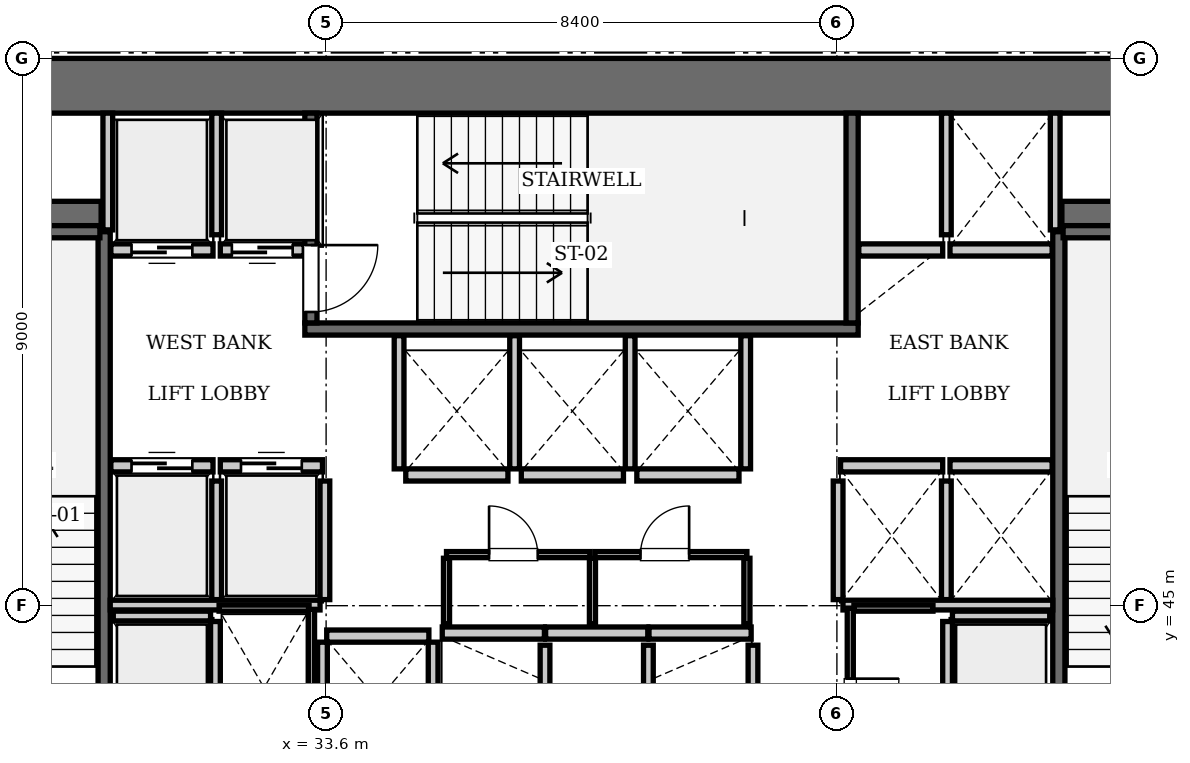
"""IFC4 building model, lengths in metres.
Left out: names, types, materials, properties, quantities, classifications, styles, units other than length and angle.
Written with IfcOpenShell. Run it as: python <this file> out.ifc"""

import sys

from ifc_helpers import new_model, si_unit, direction, frame, frame_2d, origin, place, context, subcontext, project, spatial, rectangle, extrude, element, fill, save


model = new_model("IFC4")
c1 = context("Model", 3, precision=1e-05, world=origin(), true_north=direction((0.0, 1.0)))
c2 = subcontext(c1, "Body", "Model", "MODEL_VIEW")
j1 = project(units=[si_unit("LENGTHUNIT", "METRE"), si_unit("PLANEANGLEUNIT", "RADIAN")], contexts=[c1])
p1 = place(None, origin())
s1 = spatial("IfcSite", under=j1, at=p1, CompositionType="ELEMENT")
p2 = place(p1, origin())
s2 = spatial("IfcBuilding", under=s1, at=p2, CompositionType="ELEMENT")
p3 = place(p2, frame((0.0, 0.0, 61.6)))
s3 = spatial("IfcBuildingStorey", under=s2, at=p3, CompositionType="ELEMENT", Elevation=61.6)
p4 = place(p3, frame((25.2, 53.55, 0.0), z_axis=(0.0, 0.0, 1.0), x_axis=(1.0, 0.0, 0.0)))
e1 = element("IfcWall", 1, at=p4, inside=s3, PredefinedType="SHEAR", context=c2, shape_type="SweptSolid", body=[
    extrude(rectangle(XDim=25.2, YDim=0.9, at=frame_2d((12.6, 0.0))), origin(), (0.0, 0.0, 1.0), 3.85),
])
p5 = place(p3, frame((26.1, 51.4, 0.0), z_axis=(0.0, 0.0, 1.0), x_axis=(1.0, 0.0, 0.0)))
e2 = element("IfcWall", 2, at=p5, inside=s3, PredefinedType="SHEAR", context=c2, shape_type="SweptSolid", body=[
    extrude(rectangle(XDim=3.8, YDim=0.5, at=frame_2d((1.9, 0.0))), origin(), (0.0, 0.0, 1.0), 3.85),
])
p6 = place(p3, frame((45.7, 51.4, 0.0), z_axis=(0.0, 0.0, 1.0), x_axis=(1.0, 0.0, 0.0)))
e3 = element("IfcWall", 3, at=p6, inside=s3, PredefinedType="SHEAR", context=c2, shape_type="SweptSolid", body=[
    extrude(rectangle(XDim=3.8, YDim=0.5, at=frame_2d((1.9, 0.0))), origin(), (0.0, 0.0, 1.0), 3.85),
])
p7 = place(p3, frame((29.95, 42.3, 0.0), z_axis=(0.0, 0.0, 1.0), x_axis=(0.0, 1.0, 0.0)))
e4 = element("IfcWall", 4, at=p7, inside=s3, PredefinedType="SOLIDWALL", context=c2, shape_type="SweptSolid", body=[
    extrude(rectangle(XDim=8.85, YDim=0.2, at=frame_2d((4.425, 0.0))), origin(), (0.0, 0.0, 1.0), 3.61),
])
p8 = place(p3, frame((26.38, 51.15, 0.0), z_axis=(0.0, 0.0, 1.0), x_axis=(1.0, 0.0, 0.0)))
e5 = element("IfcWall", 5, at=p8, inside=s3, PredefinedType="SOLIDWALL", context=c2, shape_type="SweptSolid", body=[
    extrude(rectangle(XDim=3.5, YDim=0.2, at=frame_2d((1.75, 0.0))), origin(), (0.0, 0.0, 1.0), 3.61),
])
p9 = place(p3, frame((33.25, 49.55, 0.0), z_axis=(0.0, 0.0, 1.0), x_axis=(1.0, 0.0, 0.0)))
e6 = element("IfcWall", 6, at=p9, inside=s3, PredefinedType="SOLIDWALL", context=c2, shape_type="SweptSolid", body=[
    extrude(rectangle(XDim=9.1, YDim=0.2, at=frame_2d((4.55, 0.0))), origin(), (0.0, 0.0, 1.0), 3.61),
])
p10 = place(p3, frame((42.25, 49.65, 0.0), z_axis=(0.0, 0.0, 1.0), x_axis=(0.0, 1.0, 0.0)))
e7 = element("IfcWall", 7, at=p10, inside=s3, PredefinedType="SOLIDWALL", context=c2, shape_type="SweptSolid", body=[
    extrude(rectangle(XDim=3.45, YDim=0.2, at=frame_2d((1.725, 0.0))), origin(), (0.0, 0.0, 1.0), 3.61),
])
p11 = place(p3, frame((33.35, 49.65, 0.0), z_axis=(0.0, 0.0, 1.0), x_axis=(0.0, 1.0, 0.0)))
e8 = element("IfcWall", 8, at=p11, inside=s3, PredefinedType="SOLIDWALL", context=c2, shape_type="SweptSolid", body=[
    extrude(rectangle(XDim=3.45, YDim=0.2, at=frame_2d((1.725, 0.0))), origin(), (0.0, 0.0, 1.0), 3.61),
])
p12 = place(p11, frame((0.18, 0.0, 0.0)))
e9 = element("IfcOpeningElement", 9, at=p12, cuts=e8, PredefinedType="OPENING", context=c2, shape_type="SweptSolid", body=[
    extrude(rectangle(XDim=1.1, YDim=2.15, at=frame_2d((0.55, 1.075))), frame((0.0, 0.11, 0.0), z_axis=(0.0, -1.0, 0.0), x_axis=(1.0, 0.0, 0.0)), (0.0, 0.0, 1.0), 0.22),
])
p13 = place(p3, frame((45.65, 42.3, 0.0), z_axis=(0.0, 0.0, 1.0), x_axis=(0.0, 1.0, 0.0)))
e10 = element("IfcWall", 10, at=p13, inside=s3, PredefinedType="SOLIDWALL", context=c2, shape_type="SweptSolid", body=[
    extrude(rectangle(XDim=8.85, YDim=0.2, at=frame_2d((4.425, 0.0))), origin(), (0.0, 0.0, 1.0), 3.61),
])
p14 = place(p3, frame((45.72, 51.15, 0.0), z_axis=(0.0, 0.0, 1.0), x_axis=(1.0, 0.0, 0.0)))
e11 = element("IfcWall", 11, at=p14, inside=s3, PredefinedType="SOLIDWALL", context=c2, shape_type="SweptSolid", body=[
    extrude(rectangle(XDim=3.5, YDim=0.2, at=frame_2d((1.75, 0.0))), origin(), (0.0, 0.0, 1.0), 3.61),
])
p15 = place(p3, frame((30.06, 47.3, 0.0), z_axis=(0.0, 0.0, 1.0), x_axis=(1.0, 0.0, 0.0)))
e12 = element("IfcWall", 12, at=p15, inside=s3, PredefinedType="SOLIDWALL", context=c2, shape_type="SweptSolid", body=[
    extrude(rectangle(XDim=1.68, YDim=0.2, at=frame_2d((0.84, 0.0))), origin(), (0.0, 0.0, 1.0), 3.61),
])
p16 = place(p15, frame((0.34, 0.0, 0.0)))
e13 = element("IfcOpeningElement", 13, at=p16, cuts=e12, PredefinedType="OPENING", context=c2, shape_type="SweptSolid", body=[
    extrude(rectangle(XDim=1.0, YDim=2.15, at=frame_2d((0.5, 1.075))), frame((0.0, 0.11, 0.0), z_axis=(0.0, -1.0, 0.0), x_axis=(1.0, 0.0, 0.0)), (0.0, 0.0, 1.0), 0.22),
])
p17 = place(p3, frame((31.86, 47.3, 0.0), z_axis=(0.0, 0.0, 1.0), x_axis=(1.0, 0.0, 0.0)))
e14 = element("IfcWall", 14, at=p17, inside=s3, PredefinedType="SOLIDWALL", context=c2, shape_type="SweptSolid", body=[
    extrude(rectangle(XDim=1.68, YDim=0.2, at=frame_2d((0.84, 0.0))), origin(), (0.0, 0.0, 1.0), 3.61),
])
p18 = place(p17, frame((0.34, 0.0, 0.0)))
e15 = element("IfcOpeningElement", 15, at=p18, cuts=e14, PredefinedType="OPENING", context=c2, shape_type="SweptSolid", body=[
    extrude(rectangle(XDim=1.0, YDim=2.15, at=frame_2d((0.5, 1.075))), frame((0.0, 0.11, 0.0), z_axis=(0.0, -1.0, 0.0), x_axis=(1.0, 0.0, 0.0)), (0.0, 0.0, 1.0), 0.22),
])
p19 = place(p3, frame((30.06, 50.85, 0.0), z_axis=(0.0, 0.0, 1.0), x_axis=(1.0, 0.0, 0.0)))
e16 = element("IfcWall", 16, at=p19, inside=s3, PredefinedType="SOLIDWALL", context=c2, shape_type="SweptSolid", body=[
    extrude(rectangle(XDim=1.68, YDim=0.2, at=frame_2d((0.84, 0.0))), origin(), (0.0, 0.0, 1.0), 3.61),
])
p20 = place(p19, frame((0.34, 0.0, 0.0)))
e17 = element("IfcOpeningElement", 17, at=p20, cuts=e16, PredefinedType="OPENING", context=c2, shape_type="SweptSolid", body=[
    extrude(rectangle(XDim=1.0, YDim=2.15, at=frame_2d((0.5, 1.075))), frame((0.0, 0.11, 0.0), z_axis=(0.0, -1.0, 0.0), x_axis=(1.0, 0.0, 0.0)), (0.0, 0.0, 1.0), 0.22),
])
p21 = place(p3, frame((31.86, 50.85, 0.0), z_axis=(0.0, 0.0, 1.0), x_axis=(1.0, 0.0, 0.0)))
e18 = element("IfcWall", 18, at=p21, inside=s3, PredefinedType="SOLIDWALL", context=c2, shape_type="SweptSolid", body=[
    extrude(rectangle(XDim=1.38, YDim=0.2, at=frame_2d((0.69, 0.0))), origin(), (0.0, 0.0, 1.0), 3.61),
])
p22 = place(p21, frame((0.19, 0.0, 0.0)))
e19 = element("IfcOpeningElement", 19, at=p22, cuts=e18, PredefinedType="OPENING", context=c2, shape_type="SweptSolid", body=[
    extrude(rectangle(XDim=1.0, YDim=2.15, at=frame_2d((0.5, 1.075))), frame((0.0, 0.11, 0.0), z_axis=(0.0, -1.0, 0.0), x_axis=(1.0, 0.0, 0.0)), (0.0, 0.0, 1.0), 0.22),
])
for number, where, z_axis, x_axis in (
    (20, (42.06, 47.3, 0.0), (0.0, 0.0, 1.0), (1.0, 0.0, 0.0)),
    (21, (43.86, 47.3, 0.0), (0.0, 0.0, 1.0), (1.0, 0.0, 0.0)),
):
    element("IfcWall", number, at=place(p3, frame(where, z_axis=z_axis, x_axis=x_axis)), inside=s3, PredefinedType="SOLIDWALL", context=c2, shape_type="SweptSolid", body=[
        extrude(rectangle(XDim=1.68, YDim=0.2, at=frame_2d((0.84, 0.0))), origin(), (0.0, 0.0, 1.0), 3.61),
    ])
p23 = place(p3, frame((42.36, 50.85, 0.0), z_axis=(0.0, 0.0, 1.0), x_axis=(1.0, 0.0, 0.0)))
e22 = element("IfcWall", 22, at=p23, inside=s3, PredefinedType="SOLIDWALL", context=c2, shape_type="SweptSolid", body=[
    extrude(rectangle(XDim=1.38, YDim=0.2, at=frame_2d((0.69, 0.0))), origin(), (0.0, 0.0, 1.0), 3.61),
])
for number, where, z_axis, x_axis in (
    (23, (43.86, 50.85, 0.0), (0.0, 0.0, 1.0), (1.0, 0.0, 0.0)),
    (24, (35.51, 44.55, 0.0), (0.0, 0.0, 1.0), (1.0, 0.0, 0.0)),
    (25, (37.21, 44.55, 0.0), (0.0, 0.0, 1.0), (1.0, 0.0, 0.0)),
):
    element("IfcWall", number, at=place(p3, frame(where, z_axis=z_axis, x_axis=x_axis)), inside=s3, PredefinedType="SOLIDWALL", context=c2, shape_type="SweptSolid", body=[
        extrude(rectangle(XDim=1.68, YDim=0.2, at=frame_2d((0.84, 0.0))), origin(), (0.0, 0.0, 1.0), 3.61),
    ])
for number, where, z_axis, x_axis in (
    (26, (38.91, 44.55, 0.0), (0.0, 0.0, 1.0), (1.0, 0.0, 0.0)),
    (27, (34.91, 47.15, 0.0), (0.0, 0.0, 1.0), (1.0, 0.0, 0.0)),
):
    element("IfcWall", number, at=place(p3, frame(where, z_axis=z_axis, x_axis=x_axis)), inside=s3, PredefinedType="SOLIDWALL", context=c2, shape_type="SweptSolid", body=[
        extrude(rectangle(XDim=1.68, YDim=0.2, at=frame_2d((0.84, 0.0))), origin(), (0.0, 0.0, 1.0), 3.61),
    ])
for number, where, z_axis, x_axis in (
    (28, (36.81, 47.15, 0.0), (0.0, 0.0, 1.0), (1.0, 0.0, 0.0)),
    (29, (38.71, 47.15, 0.0), (0.0, 0.0, 1.0), (1.0, 0.0, 0.0)),
    (30, (33.61, 44.5, 0.0), (0.0, 0.0, 1.0), (1.0, 0.0, 0.0)),
):
    element("IfcWall", number, at=place(p3, frame(where, z_axis=z_axis, x_axis=x_axis)), inside=s3, PredefinedType="SOLIDWALL", context=c2, shape_type="SweptSolid", body=[
        extrude(rectangle(XDim=1.68, YDim=0.2, at=frame_2d((0.84, 0.0))), origin(), (0.0, 0.0, 1.0), 3.61),
    ])
p24 = place(p3, frame((30.1, 44.83, 0.0), z_axis=(0.0, 0.0, 1.0), x_axis=(1.0, 0.0, 0.0)))
e31 = element("IfcWall", 31, at=p24, inside=s3, PredefinedType="SOLIDWALL", context=c2, shape_type="SweptSolid", body=[
    extrude(rectangle(XDim=1.6, YDim=0.16, at=frame_2d((0.8, 0.0))), origin(), (0.0, 0.0, 1.0), 3.61),
])
p25 = place(p3, frame((31.78, 42.3, 0.0), z_axis=(0.0, 0.0, 1.0), x_axis=(0.0, 1.0, 0.0)))
e32 = element("IfcWall", 32, at=p25, inside=s3, PredefinedType="SOLIDWALL", context=c2, shape_type="SweptSolid", body=[
    extrude(rectangle(XDim=2.44, YDim=0.16, at=frame_2d((1.22, 0.0))), origin(), (0.0, 0.0, 1.0), 3.61),
])
p26 = place(p3, frame((43.9, 44.83, 0.0), z_axis=(0.0, 0.0, 1.0), x_axis=(1.0, 0.0, 0.0)))
e33 = element("IfcWall", 33, at=p26, inside=s3, PredefinedType="SOLIDWALL", context=c2, shape_type="SweptSolid", body=[
    extrude(rectangle(XDim=1.6, YDim=0.16, at=frame_2d((0.8, 0.0))), origin(), (0.0, 0.0, 1.0), 3.61),
])
p27 = place(p3, frame((43.82, 42.3, 0.0), z_axis=(0.0, 0.0, 1.0), x_axis=(0.0, 1.0, 0.0)))
e34 = element("IfcWall", 34, at=p27, inside=s3, PredefinedType="SOLIDWALL", context=c2, shape_type="SweptSolid", body=[
    extrude(rectangle(XDim=2.44, YDim=0.16, at=frame_2d((1.22, 0.0))), origin(), (0.0, 0.0, 1.0), 3.61),
])
for number, where, z_axis, x_axis in (
    (35, (31.8, 45.1, 0.0), (0.0, 0.0, 1.0), (0.0, 1.0, 0.0)),
    (36, (33.58, 45.1, 0.0), (0.0, 0.0, 1.0), (0.0, 1.0, 0.0)),
):
    element("IfcWall", number, at=place(p3, frame(where, z_axis=z_axis, x_axis=x_axis)), inside=s3, PredefinedType="SOLIDWALL", context=c2, shape_type="SweptSolid", body=[
        extrude(rectangle(XDim=1.95, YDim=0.16, at=frame_2d((0.975, 0.0))), origin(), (0.0, 0.0, 1.0), 3.61),
    ])
p28 = place(p3, frame((30.05, 45.01, 0.0), z_axis=(0.0, 0.0, 1.0), x_axis=(1.0, 0.0, 0.0)))
e37 = element("IfcWall", 37, at=p28, inside=s3, PredefinedType="SOLIDWALL", context=c2, shape_type="SweptSolid", body=[
    extrude(rectangle(XDim=3.45, YDim=0.16, at=frame_2d((1.725, 0.0))), origin(), (0.0, 0.0, 1.0), 3.61),
])
p29 = place(p3, frame((30.01, 51.18, 0.0), z_axis=(0.0, 0.0, 1.0), x_axis=(0.0, 1.0, 0.0)))
e38 = element("IfcWall", 38, at=p29, inside=s3, PredefinedType="SOLIDWALL", context=c2, shape_type="SweptSolid", body=[
    extrude(rectangle(XDim=1.92, YDim=0.16, at=frame_2d((0.96, 0.0))), origin(), (0.0, 0.0, 1.0), 3.61),
])
p30 = place(p3, frame((31.8, 51.1, 0.0), z_axis=(0.0, 0.0, 1.0), x_axis=(0.0, 1.0, 0.0)))
e39 = element("IfcWall", 39, at=p30, inside=s3, PredefinedType="SOLIDWALL", context=c2, shape_type="SweptSolid", body=[
    extrude(rectangle(XDim=2.0, YDim=0.16, at=frame_2d((1.0, 0.0))), origin(), (0.0, 0.0, 1.0), 3.61),
])
for number, where, z_axis, x_axis in (
    (40, (42.02, 45.1, 0.0), (0.0, 0.0, 1.0), (0.0, 1.0, 0.0)),
    (41, (43.8, 45.1, 0.0), (0.0, 0.0, 1.0), (0.0, 1.0, 0.0)),
):
    element("IfcWall", number, at=place(p3, frame(where, z_axis=z_axis, x_axis=x_axis)), inside=s3, PredefinedType="SOLIDWALL", context=c2, shape_type="SweptSolid", body=[
        extrude(rectangle(XDim=1.95, YDim=0.16, at=frame_2d((0.975, 0.0))), origin(), (0.0, 0.0, 1.0), 3.61),
    ])
p31 = place(p3, frame((42.1, 45.01, 0.0), z_axis=(0.0, 0.0, 1.0), x_axis=(1.0, 0.0, 0.0)))
e42 = element("IfcWall", 42, at=p31, inside=s3, PredefinedType="SOLIDWALL", context=c2, shape_type="SweptSolid", body=[
    extrude(rectangle(XDim=3.45, YDim=0.16, at=frame_2d((1.725, 0.0))), origin(), (0.0, 0.0, 1.0), 3.61),
])
p32 = place(p3, frame((45.59, 51.18, 0.0), z_axis=(0.0, 0.0, 1.0), x_axis=(0.0, 1.0, 0.0)))
e43 = element("IfcWall", 43, at=p32, inside=s3, PredefinedType="SOLIDWALL", context=c2, shape_type="SweptSolid", body=[
    extrude(rectangle(XDim=1.92, YDim=0.16, at=frame_2d((0.96, 0.0))), origin(), (0.0, 0.0, 1.0), 3.61),
])
p33 = place(p3, frame((43.8, 51.1, 0.0), z_axis=(0.0, 0.0, 1.0), x_axis=(0.0, 1.0, 0.0)))
e44 = element("IfcWall", 44, at=p33, inside=s3, PredefinedType="SOLIDWALL", context=c2, shape_type="SweptSolid", body=[
    extrude(rectangle(XDim=2.0, YDim=0.16, at=frame_2d((1.0, 0.0))), origin(), (0.0, 0.0, 1.0), 3.61),
])
for number, where, z_axis, x_axis in (
    (45, (37.2, 42.3, 0.0), (0.0, 0.0, 1.0), (0.0, 1.0, 0.0)),
    (46, (38.9, 42.3, 0.0), (0.0, 0.0, 1.0), (0.0, 1.0, 0.0)),
    (47, (40.62, 42.3, 0.0), (0.0, 0.0, 1.0), (0.0, 1.0, 0.0)),
):
    element("IfcWall", number, at=place(p3, frame(where, z_axis=z_axis, x_axis=x_axis)), inside=s3, PredefinedType="SOLIDWALL", context=c2, shape_type="SweptSolid", body=[
        extrude(rectangle(XDim=2.05, YDim=0.16, at=frame_2d((1.025, 0.0))), origin(), (0.0, 0.0, 1.0), 3.61),
    ])
for number, where, z_axis, x_axis in (
    (48, (34.8, 47.25, 0.0), (0.0, 0.0, 1.0), (0.0, 1.0, 0.0)),
    (49, (36.7, 47.25, 0.0), (0.0, 0.0, 1.0), (0.0, 1.0, 0.0)),
    (50, (38.6, 47.25, 0.0), (0.0, 0.0, 1.0), (0.0, 1.0, 0.0)),
    (51, (40.5, 47.25, 0.0), (0.0, 0.0, 1.0), (0.0, 1.0, 0.0)),
):
    element("IfcWall", number, at=place(p3, frame(where, z_axis=z_axis, x_axis=x_axis)), inside=s3, PredefinedType="SOLIDWALL", context=c2, shape_type="SweptSolid", body=[
        extrude(rectangle(XDim=2.19, YDim=0.16, at=frame_2d((1.095, 0.0))), origin(), (0.0, 0.0, 1.0), 3.61),
    ])
for number, where, z_axis, x_axis in (
    (52, (33.54, 42.3, 0.0), (0.0, 0.0, 1.0), (0.0, 1.0, 0.0)),
    (53, (35.36, 42.3, 0.0), (0.0, 0.0, 1.0), (0.0, 1.0, 0.0)),
):
    element("IfcWall", number, at=place(p3, frame(where, z_axis=z_axis, x_axis=x_axis)), inside=s3, PredefinedType="SOLIDWALL", context=c2, shape_type="SweptSolid", body=[
        extrude(rectangle(XDim=2.1, YDim=0.16, at=frame_2d((1.05, 0.0))), origin(), (0.0, 0.0, 1.0), 3.61),
    ])
p34 = place(p3, frame((31.84, 44.96, 0.0), z_axis=(0.0, 0.0, 1.0), x_axis=(1.0, 0.0, 0.0)))
e54 = element("IfcWall", 54, at=p34, inside=s3, PredefinedType="PARTITIONING", context=c2, shape_type="SweptSolid", body=[
    extrude(rectangle(XDim=1.48, YDim=0.1, at=frame_2d((0.74, 0.0))), origin(), (0.0, 0.0, 1.0), 3.61),
])
p35 = place(p3, frame((33.36, 42.36, 0.0), z_axis=(0.0, 0.0, 1.0), x_axis=(0.0, 1.0, 0.0)))
e55 = element("IfcWall", 55, at=p35, inside=s3, PredefinedType="PARTITIONING", context=c2, shape_type="SweptSolid", body=[
    extrude(rectangle(XDim=2.58, YDim=0.1, at=frame_2d((1.29, 0.0))), origin(), (0.0, 0.0, 1.0), 3.61),
])
p36 = place(p3, frame((35.58, 45.84, 0.0), z_axis=(0.0, 0.0, 1.0), x_axis=(1.0, 0.0, 0.0)))
e56 = element("IfcWall", 56, at=p36, inside=s3, PredefinedType="PARTITIONING", context=c2, shape_type="SweptSolid", body=[
    extrude(rectangle(XDim=2.36, YDim=0.1, at=frame_2d((1.18, 0.0))), origin(), (0.0, 0.0, 1.0), 3.61),
])
p37 = place(p36, frame((0.7, 0.0, 0.0)))
e57 = element("IfcOpeningElement", 57, at=p37, cuts=e56, PredefinedType="OPENING", context=c2, shape_type="SweptSolid", body=[
    extrude(rectangle(XDim=0.8, YDim=2.05, at=frame_2d((0.4, 1.025))), frame((0.0, 0.06, 0.0), z_axis=(0.0, -1.0, 0.0), x_axis=(1.0, 0.0, 0.0)), (0.0, 0.0, 1.0), 0.12),
])
p38 = place(p3, frame((38.02, 45.84, 0.0), z_axis=(0.0, 0.0, 1.0), x_axis=(1.0, 0.0, 0.0)))
e58 = element("IfcWall", 58, at=p38, inside=s3, PredefinedType="PARTITIONING", context=c2, shape_type="SweptSolid", body=[
    extrude(rectangle(XDim=2.5, YDim=0.1, at=frame_2d((1.25, 0.0))), origin(), (0.0, 0.0, 1.0), 3.61),
])
p39 = place(p38, frame((0.75, 0.0, 0.0)))
e59 = element("IfcOpeningElement", 59, at=p39, cuts=e58, PredefinedType="OPENING", context=c2, shape_type="SweptSolid", body=[
    extrude(rectangle(XDim=0.8, YDim=2.05, at=frame_2d((0.4, 1.025))), frame((0.0, 0.06, 0.0), z_axis=(0.0, -1.0, 0.0), x_axis=(1.0, 0.0, 0.0)), (0.0, 0.0, 1.0), 0.12),
])
for number, where, z_axis, x_axis in (
    (60, (35.58, 44.7, 0.0), (0.0, 0.0, 1.0), (0.0, 1.0, 0.0)),
    (61, (37.98, 44.7, 0.0), (0.0, 0.0, 1.0), (0.0, 1.0, 0.0)),
    (62, (40.52, 44.7, 0.0), (0.0, 0.0, 1.0), (0.0, 1.0, 0.0)),
):
    element("IfcWall", number, at=place(p3, frame(where, z_axis=z_axis, x_axis=x_axis)), inside=s3, PredefinedType="PARTITIONING", context=c2, shape_type="SweptSolid", body=[
        extrude(rectangle(XDim=1.08, YDim=0.1, at=frame_2d((0.54, 0.0))), origin(), (0.0, 0.0, 1.0), 3.61),
    ])
p40 = place(p3, frame((42.22, 42.35, 0.0), z_axis=(0.0, 0.0, 1.0), x_axis=(0.0, 1.0, 0.0)))
e63 = element("IfcWall", 63, at=p40, inside=s3, PredefinedType="PARTITIONING", context=c2, shape_type="SweptSolid", body=[
    extrude(rectangle(XDim=2.61, YDim=0.1, at=frame_2d((1.305, 0.0))), origin(), (0.0, 0.0, 1.0), 3.61),
])
p41 = place(p40, frame((0.65, 0.0, 0.0)))
e64 = element("IfcOpeningElement", 64, at=p41, cuts=e63, PredefinedType="OPENING", context=c2, shape_type="SweptSolid", body=[
    extrude(rectangle(XDim=0.8, YDim=2.05, at=frame_2d((0.4, 1.025))), frame((0.0, 0.06, 0.0), z_axis=(0.0, -1.0, 0.0), x_axis=(1.0, 0.0, 0.0)), (0.0, 0.0, 1.0), 0.12),
])
p42 = place(p3, frame((42.28, 44.96, 0.0), z_axis=(0.0, 0.0, 1.0), x_axis=(1.0, 0.0, 0.0)))
e65 = element("IfcWall", 65, at=p42, inside=s3, PredefinedType="PARTITIONING", context=c2, shape_type="SweptSolid", body=[
    extrude(rectangle(XDim=1.3, YDim=0.1, at=frame_2d((0.65, 0.0))), origin(), (0.0, 0.0, 1.0), 3.61),
])
p43 = place(p12, frame((1.1, 0.0, 0.0), z_axis=(0.0, 0.0, 1.0), x_axis=(-1.0, 0.0, 0.0)))
e66 = element("IfcDoor", 66, at=p43, inside=s3, OperationType="SINGLE_SWING_LEFT", PredefinedType="DOOR", context=c2, shape_type="SweptSolid", body=[
    extrude(rectangle(XDim=1.1, YDim=2.15, at=frame_2d((0.55, 1.075))), frame((0.0, 0.025, 0.0), z_axis=(0.0, -1.0, 0.0), x_axis=(1.0, 0.0, 0.0)), (0.0, 0.0, 1.0), 0.05),
])
fill(e9, e66)
p44 = place(p16, origin())
e67 = element("IfcDoor", 67, at=p44, inside=s3, OperationType="SLIDING_TO_LEFT", PredefinedType="DOOR", context=c2, shape_type="SweptSolid", body=[
    extrude(rectangle(XDim=1.0, YDim=2.15, at=frame_2d((0.5, 1.075))), frame((0.0, 0.025, 0.0), z_axis=(0.0, -1.0, 0.0), x_axis=(1.0, 0.0, 0.0)), (0.0, 0.0, 1.0), 0.05),
])
fill(e13, e67)
p45 = place(p18, origin())
e68 = element("IfcDoor", 68, at=p45, inside=s3, OperationType="SLIDING_TO_LEFT", PredefinedType="DOOR", context=c2, shape_type="SweptSolid", body=[
    extrude(rectangle(XDim=1.0, YDim=2.15, at=frame_2d((0.5, 1.075))), frame((0.0, 0.025, 0.0), z_axis=(0.0, -1.0, 0.0), x_axis=(1.0, 0.0, 0.0)), (0.0, 0.0, 1.0), 0.05),
])
fill(e15, e68)
p46 = place(p20, frame((1.0, 0.0, 0.0), z_axis=(0.0, 0.0, 1.0), x_axis=(-1.0, 0.0, 0.0)))
e69 = element("IfcDoor", 69, at=p46, inside=s3, OperationType="SLIDING_TO_LEFT", PredefinedType="DOOR", context=c2, shape_type="SweptSolid", body=[
    extrude(rectangle(XDim=1.0, YDim=2.15, at=frame_2d((0.5, 1.075))), frame((0.0, 0.025, 0.0), z_axis=(0.0, -1.0, 0.0), x_axis=(1.0, 0.0, 0.0)), (0.0, 0.0, 1.0), 0.05),
])
fill(e17, e69)
p47 = place(p22, frame((1.0, 0.0, 0.0), z_axis=(0.0, 0.0, 1.0), x_axis=(-1.0, 0.0, 0.0)))
e70 = element("IfcDoor", 70, at=p47, inside=s3, OperationType="SLIDING_TO_LEFT", PredefinedType="DOOR", context=c2, shape_type="SweptSolid", body=[
    extrude(rectangle(XDim=1.0, YDim=2.15, at=frame_2d((0.5, 1.075))), frame((0.0, 0.025, 0.0), z_axis=(0.0, -1.0, 0.0), x_axis=(1.0, 0.0, 0.0)), (0.0, 0.0, 1.0), 0.05),
])
fill(e19, e70)
p48 = place(p37, origin())
e71 = element("IfcDoor", 71, at=p48, inside=s3, OperationType="SINGLE_SWING_LEFT", PredefinedType="DOOR", context=c2, shape_type="SweptSolid", body=[
    extrude(rectangle(XDim=0.8, YDim=2.05, at=frame_2d((0.4, 1.025))), frame((0.0, 0.025, 0.0), z_axis=(0.0, -1.0, 0.0), x_axis=(1.0, 0.0, 0.0)), (0.0, 0.0, 1.0), 0.05),
])
fill(e57, e71)
p49 = place(p39, origin())
e72 = element("IfcDoor", 72, at=p49, inside=s3, OperationType="SINGLE_SWING_RIGHT", PredefinedType="DOOR", context=c2, shape_type="SweptSolid", body=[
    extrude(rectangle(XDim=0.8, YDim=2.05, at=frame_2d((0.4, 1.025))), frame((0.0, 0.025, 0.0), z_axis=(0.0, -1.0, 0.0), x_axis=(1.0, 0.0, 0.0)), (0.0, 0.0, 1.0), 0.05),
])
fill(e59, e72)
p50 = place(p41, frame((0.8, 0.0, 0.0), z_axis=(0.0, 0.0, 1.0), x_axis=(-1.0, 0.0, 0.0)))
e73 = element("IfcDoor", 73, at=p50, inside=s3, OperationType="SINGLE_SWING_LEFT", PredefinedType="DOOR", context=c2, shape_type="SweptSolid", body=[
    extrude(rectangle(XDim=0.8, YDim=2.05, at=frame_2d((0.4, 1.025))), frame((0.0, 0.025, 0.0), z_axis=(0.0, -1.0, 0.0), x_axis=(1.0, 0.0, 0.0)), (0.0, 0.0, 1.0), 0.05),
])
fill(e64, e73)
save(model, sys.argv[1])
